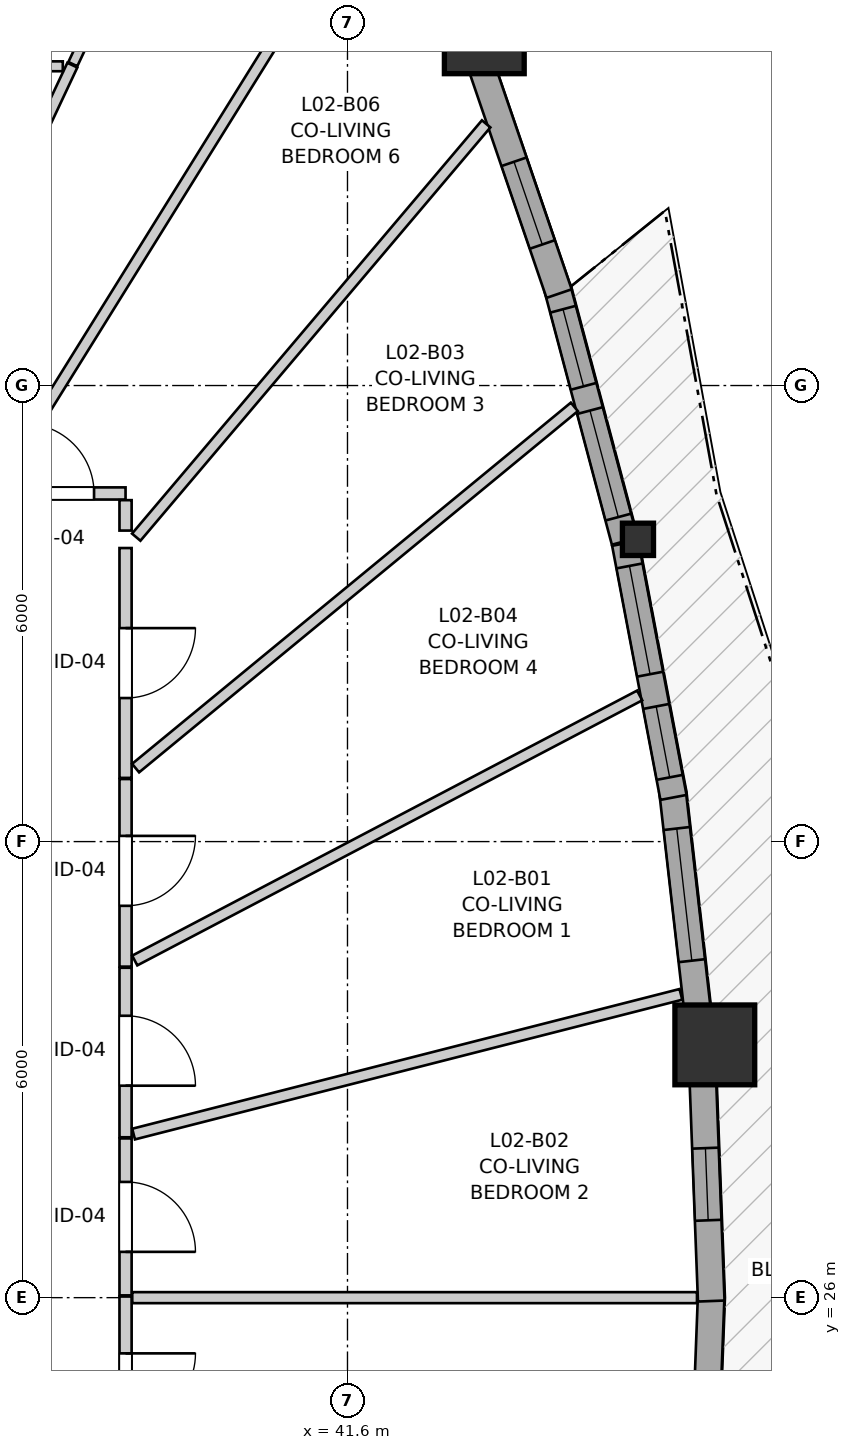
"""IFC4 building model, lengths in metres.
Left out: names, types, materials, properties, quantities, classifications, styles, units other than length and angle.
Written with IfcOpenShell. Run it as: python <this file> out.ifc"""

import sys

from ifc_helpers import new_model, si_unit, direction, frame, frame_2d, origin, origin_2d, place, context, subcontext, project, spatial, rectangle, i_section, extrude, source, transform, mapped, element, fill, save


model = new_model("IFC4")
c1 = context("Model", 3, precision=1e-05, world=origin(), true_north=direction((0.0, 1.0)))
c2 = subcontext(c1, "Body", "Model", "MODEL_VIEW")
j1 = project(units=[si_unit("LENGTHUNIT", "METRE"), si_unit("PLANEANGLEUNIT", "RADIAN")], contexts=[c1])
p1 = place(None, origin())
s1 = spatial("IfcSite", under=j1, at=p1, CompositionType="ELEMENT")
p2 = place(p1, origin())
s2 = spatial("IfcBuilding", under=s1, at=p2, CompositionType="ELEMENT")
p3 = place(p2, frame((0.0, 0.0, 11.0)))
s3 = spatial("IfcBuildingStorey", under=s2, at=p3, CompositionType="ELEMENT", Elevation=11.0)
m1 = source(origin(), c2, "Body", "SweptSolid", [
    extrude(rectangle(XDim=1.05, YDim=1.05, at=origin_2d()), origin(), (0.0, 0.0, 1.0), 2.94),
])
p4 = place(p3, frame((46.433, 29.325, 0.0), z_axis=(0.0, 0.0, 1.0), x_axis=(1.0, 0.0, 0.0)))
e1 = element("IfcColumn", 1, at=p4, inside=s3, PredefinedType="COLUMN", context=c2, shape_type="MappedRepresentation", body=[
    mapped(m1, transform((0.0, 0.0, 0.0), x_axis=(1.0, 0.0, 0.0), y_axis=(0.0, 1.0, 0.0), z_axis=(0.0, 0.0, 1.0), scale=1.0)),
])
m2 = source(origin(), c2, "Body", "SweptSolid", [
    extrude(i_section(OverallWidth=0.409, OverallDepth=0.425, WebThickness=0.03, FlangeThickness=0.048, FilletRadius=0.015, at=origin_2d()), origin(), (0.0, 0.0, 1.0), 2.94),
])
p5 = place(p3, frame((45.422, 35.977, 0.0), z_axis=(0.0, 0.0, 1.0), x_axis=(1.0, 0.0, 0.0)))
e2 = element("IfcColumn", 2, at=p5, inside=s3, PredefinedType="PILASTER", context=c2, shape_type="MappedRepresentation", body=[
    mapped(m2, transform((0.0, 0.0, 0.0), x_axis=(1.0, 0.0, 0.0), y_axis=(0.0, 1.0, 0.0), z_axis=(0.0, 0.0, 1.0), scale=1.0)),
])
p6 = place(p3, frame((43.4, 42.628, 0.0), z_axis=(0.0, 0.0, 1.0), x_axis=(1.0, 0.0, 0.0)))
e3 = element("IfcColumn", 3, at=p6, inside=s3, PredefinedType="COLUMN", context=c2, shape_type="MappedRepresentation", body=[
    mapped(m1, transform((0.0, 0.0, 0.0), x_axis=(1.0, 0.0, 0.0), y_axis=(0.0, 1.0, 0.0), z_axis=(0.0, 0.0, 1.0), scale=1.0)),
])
p7 = place(p3, frame((46.259, 22.701, 0.0), z_axis=(0.0, 0.0, 1.0), x_axis=(0.038015581842, 0.99927714651, 0.0)))
e4 = element("IfcWall", 4, at=p7, inside=s3, PredefinedType="SOLIDWALL", context=c2, shape_type="SweptSolid", body=[
    extrude(rectangle(XDim=3.346, YDim=0.35, at=frame_2d((1.673, 0.0))), origin(), (0.0, 0.0, 1.0), 2.42),
])
p8 = place(p7, frame((1.038, 0.0, 0.82)))
e5 = element("IfcOpeningElement", 5, at=p8, cuts=e4, PredefinedType="OPENING", context=c2, shape_type="SweptSolid", body=[
    extrude(rectangle(XDim=1.25, YDim=1.35, at=frame_2d((0.625, 0.675))), frame((0.0, 0.185, 0.0), z_axis=(0.0, -1.0, 0.0), x_axis=(1.0, 0.0, 0.0)), (0.0, 0.0, 1.0), 0.37),
])
p9 = place(p3, frame((46.386, 25.955, 0.0), z_axis=(0.0, 0.0, 1.0), x_axis=(-0.038063081658, 0.99927533834, 0.0)))
e6 = element("IfcWall", 6, at=p9, inside=s3, PredefinedType="SOLIDWALL", context=c2, shape_type="SweptSolid", body=[
    extrude(rectangle(XDim=3.066, YDim=0.35, at=frame_2d((1.533, 0.0))), origin(), (0.0, 0.0, 1.0), 2.42),
])
p10 = place(p9, frame((1.063, 0.0, 0.82)))
e7 = element("IfcOpeningElement", 7, at=p10, cuts=e6, PredefinedType="OPENING", context=c2, shape_type="SweptSolid", body=[
    extrude(rectangle(XDim=0.95, YDim=1.35, at=frame_2d((0.475, 0.675))), frame((0.0, 0.185, 0.0), z_axis=(0.0, -1.0, 0.0), x_axis=(1.0, 0.0, 0.0)), (0.0, 0.0, 1.0), 0.37),
])
p11 = place(p3, frame((46.225, 29.604, 0.0), z_axis=(0.0, 0.0, 1.0), x_axis=(-0.113323399269, 0.993558154905, 0.0)))
e8 = element("IfcWall", 8, at=p11, inside=s3, PredefinedType="SOLIDWALL", context=c2, shape_type="SweptSolid", body=[
    extrude(rectangle(XDim=3.085, YDim=0.35, at=frame_2d((1.542, 0.0))), origin(), (0.0, 0.0, 1.0), 2.42),
])
p12 = place(p11, frame((0.835, 0.0, 0.82)))
e9 = element("IfcOpeningElement", 9, at=p12, cuts=e8, PredefinedType="OPENING", context=c2, shape_type="SweptSolid", body=[
    extrude(rectangle(XDim=1.75, YDim=1.3, at=frame_2d((0.875, 0.65))), frame((0.0, 0.185, 0.0), z_axis=(0.0, -1.0, 0.0), x_axis=(1.0, 0.0, 0.0)), (0.0, 0.0, 1.0), 0.37),
])
p13 = place(p3, frame((45.889, 32.581, 0.0), z_axis=(0.0, 0.0, 1.0), x_axis=(-0.186670339622, 0.98242260983, 0.0)))
e10 = element("IfcWall", 10, at=p13, inside=s3, PredefinedType="SOLIDWALL", context=c2, shape_type="SweptSolid", body=[
    extrude(rectangle(XDim=3.403, YDim=0.35, at=frame_2d((1.702, 0.0))), origin(), (0.0, 0.0, 1.0), 2.42),
])
p14 = place(p13, frame((0.269, 0.0, 0.82)))
e11 = element("IfcOpeningElement", 11, at=p14, cuts=e10, PredefinedType="OPENING", context=c2, shape_type="SweptSolid", body=[
    extrude(rectangle(XDim=0.95, YDim=1.35, at=frame_2d((0.475, 0.675))), frame((0.0, 0.185, 0.0), z_axis=(0.0, -1.0, 0.0), x_axis=(1.0, 0.0, 0.0)), (0.0, 0.0, 1.0), 0.37),
])
p15 = place(p13, frame((1.65, 0.0, 0.82)))
e12 = element("IfcOpeningElement", 12, at=p15, cuts=e10, PredefinedType="OPENING", context=c2, shape_type="SweptSolid", body=[
    extrude(rectangle(XDim=1.45, YDim=1.25, at=frame_2d((0.725, 0.625))), frame((0.0, 0.185, 0.0), z_axis=(0.0, -1.0, 0.0), x_axis=(1.0, 0.0, 0.0)), (0.0, 0.0, 1.0), 0.37),
])
p16 = place(p3, frame((45.248, 35.951, 0.0), z_axis=(0.0, 0.0, 1.0), x_axis=(-0.25703883136, 0.966401075731, 0.0)))
e13 = element("IfcWall", 13, at=p16, inside=s3, PredefinedType="SOLIDWALL", context=c2, shape_type="SweptSolid", body=[
    extrude(rectangle(XDim=3.459, YDim=0.35, at=frame_2d((1.729, 0.0))), origin(), (0.0, 0.0, 1.0), 2.42),
])
p17 = place(p16, frame((0.329, 0.0, 0.82)))
e14 = element("IfcOpeningElement", 14, at=p17, cuts=e13, PredefinedType="OPENING", context=c2, shape_type="SweptSolid", body=[
    extrude(rectangle(XDim=1.45, YDim=1.25, at=frame_2d((0.725, 0.625))), frame((0.0, 0.185, 0.0), z_axis=(0.0, -1.0, 0.0), x_axis=(1.0, 0.0, 0.0)), (0.0, 0.0, 1.0), 0.37),
])
p18 = place(p16, frame((2.109, 0.0, 0.82)))
e15 = element("IfcOpeningElement", 15, at=p18, cuts=e13, PredefinedType="OPENING", context=c2, shape_type="SweptSolid", body=[
    extrude(rectangle(XDim=1.05, YDim=1.45, at=frame_2d((0.525, 0.725))), frame((0.0, 0.185, 0.0), z_axis=(0.0, -1.0, 0.0), x_axis=(1.0, 0.0, 0.0)), (0.0, 0.0, 1.0), 0.37),
])
p19 = place(p3, frame((44.384, 39.21, 0.0), z_axis=(0.0, 0.0, 1.0), x_axis=(-0.323604561993, 0.946192415663, 0.0)))
e16 = element("IfcWall", 16, at=p19, inside=s3, PredefinedType="SOLIDWALL", context=c2, shape_type="SweptSolid", body=[
    extrude(rectangle(XDim=3.252, YDim=0.35, at=frame_2d((1.626, 0.0))), origin(), (0.0, 0.0, 1.0), 2.42),
])
p20 = place(p19, frame((0.683, 0.0, 0.82)))
e17 = element("IfcOpeningElement", 17, at=p20, cuts=e16, PredefinedType="OPENING", context=c2, shape_type="SweptSolid", body=[
    extrude(rectangle(XDim=1.15, YDim=1.2, at=frame_2d((0.575, 0.6))), frame((0.0, 0.185, 0.0), z_axis=(0.0, -1.0, 0.0), x_axis=(1.0, 0.0, 0.0)), (0.0, 0.0, 1.0), 0.37),
])
p21 = place(p3, frame((38.68, 35.862, 0.0), z_axis=(0.0, 0.0, 1.0), x_axis=(0.0, -1.0, 0.0)))
e18 = element("IfcWall", 18, at=p21, inside=s3, PredefinedType="PARTITIONING", context=c2, shape_type="SweptSolid", body=[
    extrude(rectangle(XDim=3.024, YDim=0.16, at=frame_2d((1.512, 0.0))), origin(), (0.0, 0.0, 1.0), 2.94),
])
p22 = place(p21, frame((1.053, 0.0, 0.0)))
e19 = element("IfcOpeningElement", 19, at=p22, cuts=e18, PredefinedType="OPENING", context=c2, shape_type="SweptSolid", body=[
    extrude(rectangle(XDim=0.92, YDim=2.1, at=frame_2d((0.46, 1.05))), frame((0.0, 0.09, 0.0), z_axis=(0.0, -1.0, 0.0), x_axis=(1.0, 0.0, 0.0)), (0.0, 0.0, 1.0), 0.18),
])
p23 = place(p3, frame((38.68, 32.823, 0.0), z_axis=(0.0, 0.0, 1.0), x_axis=(0.0, -1.0, 0.0)))
e20 = element("IfcWall", 20, at=p23, inside=s3, PredefinedType="PARTITIONING", context=c2, shape_type="SweptSolid", body=[
    extrude(rectangle(XDim=2.468, YDim=0.16, at=frame_2d((1.234, 0.0))), origin(), (0.0, 0.0, 1.0), 2.94),
])
p24 = place(p23, frame((0.748, 0.0, 0.0)))
e21 = element("IfcOpeningElement", 21, at=p24, cuts=e20, PredefinedType="OPENING", context=c2, shape_type="SweptSolid", body=[
    extrude(rectangle(XDim=0.92, YDim=2.1, at=frame_2d((0.46, 1.05))), frame((0.0, 0.09, 0.0), z_axis=(0.0, -1.0, 0.0), x_axis=(1.0, 0.0, 0.0)), (0.0, 0.0, 1.0), 0.18),
])
p25 = place(p3, frame((38.68, 26.015, 0.0), z_axis=(0.0, 0.0, 1.0), x_axis=(0.0, -1.0, 0.0)))
e22 = element("IfcWall", 22, at=p25, inside=s3, PredefinedType="PARTITIONING", context=c2, shape_type="SweptSolid", body=[
    extrude(rectangle(XDim=2.37, YDim=0.16, at=frame_2d((1.185, 0.0))), origin(), (0.0, 0.0, 1.0), 2.94),
])
p26 = place(p25, frame((0.748, 0.0, 0.0)))
e23 = element("IfcOpeningElement", 23, at=p26, cuts=e22, PredefinedType="OPENING", context=c2, shape_type="SweptSolid", body=[
    extrude(rectangle(XDim=0.92, YDim=2.1, at=frame_2d((0.46, 1.05))), frame((0.0, 0.09, 0.0), z_axis=(0.0, -1.0, 0.0), x_axis=(1.0, 0.0, 0.0)), (0.0, 0.0, 1.0), 0.18),
])
p27 = place(p3, frame((38.68, 30.34, 0.0), z_axis=(0.0, 0.0, 1.0), x_axis=(0.0, -1.0, 0.0)))
e24 = element("IfcWall", 24, at=p27, inside=s3, PredefinedType="PARTITIONING", context=c2, shape_type="SweptSolid", body=[
    extrude(rectangle(XDim=2.23, YDim=0.16, at=frame_2d((1.115, 0.0))), origin(), (0.0, 0.0, 1.0), 2.94),
])
p28 = place(p27, frame((0.632, 0.0, 0.0)))
e25 = element("IfcOpeningElement", 25, at=p28, cuts=e24, PredefinedType="OPENING", context=c2, shape_type="SweptSolid", body=[
    extrude(rectangle(XDim=0.92, YDim=2.1, at=frame_2d((0.46, 1.05))), frame((0.0, 0.09, 0.0), z_axis=(0.0, -1.0, 0.0), x_axis=(1.0, 0.0, 0.0)), (0.0, 0.0, 1.0), 0.18),
])
p29 = place(p3, frame((38.68, 28.095, 0.0), z_axis=(0.0, 0.0, 1.0), x_axis=(0.0, -1.0, 0.0)))
e26 = element("IfcWall", 26, at=p29, inside=s3, PredefinedType="PARTITIONING", context=c2, shape_type="SweptSolid", body=[
    extrude(rectangle(XDim=2.065, YDim=0.16, at=frame_2d((1.032, 0.0))), origin(), (0.0, 0.0, 1.0), 2.94),
])
p30 = place(p29, frame((0.573, 0.0, 0.0)))
e27 = element("IfcOpeningElement", 27, at=p30, cuts=e26, PredefinedType="OPENING", context=c2, shape_type="SweptSolid", body=[
    extrude(rectangle(XDim=0.92, YDim=2.1, at=frame_2d((0.46, 1.05))), frame((0.0, 0.09, 0.0), z_axis=(0.0, -1.0, 0.0), x_axis=(1.0, 0.0, 0.0)), (0.0, 0.0, 1.0), 0.18),
])
p31 = place(p3, frame((36.913, 36.58, 0.0), z_axis=(0.0, 0.0, 1.0), x_axis=(1.0, 0.0, 0.0)))
e28 = element("IfcWall", 28, at=p31, inside=s3, PredefinedType="PARTITIONING", context=c2, shape_type="SweptSolid", body=[
    extrude(rectangle(XDim=1.767, YDim=0.16, at=frame_2d((0.883, 0.0))), origin(), (0.0, 0.0, 1.0), 2.94),
])
p32 = place(p31, frame((0.433, 0.0, 0.0)))
e29 = element("IfcOpeningElement", 29, at=p32, cuts=e28, PredefinedType="OPENING", context=c2, shape_type="SweptSolid", body=[
    extrude(rectangle(XDim=0.92, YDim=2.1, at=frame_2d((0.46, 1.05))), frame((0.0, 0.09, 0.0), z_axis=(0.0, -1.0, 0.0), x_axis=(1.0, 0.0, 0.0)), (0.0, 0.0, 1.0), 0.18),
])
p33 = place(p3, frame((37.009, 36.705, 0.0), z_axis=(0.0, 0.0, 1.0), x_axis=(0.528183829193, 0.849130050451, 0.0)))
e30 = element("IfcWall", 30, at=p33, inside=s3, PredefinedType="PARTITIONING", context=c2, shape_type="SweptSolid", body=[
    extrude(rectangle(XDim=10.005, YDim=0.145, at=frame_2d((5.003, 0.0))), origin(), (0.0, 0.0, 1.0), 2.94),
])
p34 = place(p3, frame((38.812, 32.967, 0.0), z_axis=(0.0, 0.0, 1.0), x_axis=(0.772048037558, 0.635564180633, 0.0)))
e31 = element("IfcWall", 31, at=p34, inside=s3, PredefinedType="PARTITIONING", context=c2, shape_type="SweptSolid", body=[
    extrude(rectangle(XDim=7.477, YDim=0.145, at=frame_2d((3.739, 0.0))), origin(), (0.0, 0.0, 1.0), 2.94),
])
p35 = place(p3, frame((38.801, 30.435, 0.0), z_axis=(0.0, 0.0, 1.0), x_axis=(0.885428701358, 0.46477523042, 0.0)))
e32 = element("IfcWall", 32, at=p35, inside=s3, PredefinedType="PARTITIONING", context=c2, shape_type="SweptSolid", body=[
    extrude(rectangle(XDim=7.503, YDim=0.145, at=frame_2d((3.751, 0.0))), origin(), (0.0, 0.0, 1.0), 2.94),
])
p36 = place(p3, frame((38.786, 28.152, 0.0), z_axis=(0.0, 0.0, 1.0), x_axis=(0.968940490632, 0.247294006424, 0.0)))
e33 = element("IfcWall", 33, at=p36, inside=s3, PredefinedType="PARTITIONING", context=c2, shape_type="SweptSolid", body=[
    extrude(rectangle(XDim=7.432, YDim=0.145, at=frame_2d((3.716, 0.0))), origin(), (0.0, 0.0, 1.0), 2.94),
])
p37 = place(p3, frame((38.768, 26.0, 0.0), z_axis=(0.0, 0.0, 1.0), x_axis=(1.0, 0.0, 0.0)))
e34 = element("IfcWall", 34, at=p37, inside=s3, PredefinedType="PARTITIONING", context=c2, shape_type="SweptSolid", body=[
    extrude(rectangle(XDim=7.43, YDim=0.145, at=frame_2d((3.715, 0.0))), origin(), (0.0, 0.0, 1.0), 2.94),
])
p38 = place(p3, frame((38.821, 36.005, 0.0), z_axis=(0.0, 0.0, 1.0), x_axis=(0.646174151972, 0.76318999294, 0.0)))
e35 = element("IfcWall", 35, at=p38, inside=s3, PredefinedType="PARTITIONING", context=c2, shape_type="SweptSolid", body=[
    extrude(rectangle(XDim=7.125, YDim=0.145, at=frame_2d((3.562, 0.0))), origin(), (0.0, 0.0, 1.0), 2.94),
])
p39 = place(p3, frame((35.385, 36.698, 0.0), z_axis=(0.0, 0.0, 1.0), x_axis=(0.425687116038, 0.904870421242, 0.0)))
e36 = element("IfcWall", 36, at=p39, inside=s3, PredefinedType="PARTITIONING", context=c2, shape_type="SweptSolid", body=[
    extrude(rectangle(XDim=6.097, YDim=0.145, at=frame_2d((3.049, 0.0))), origin(), (0.0, 0.0, 1.0), 2.94),
])
p40 = place(p3, frame((37.987, 42.229, 0.0), z_axis=(0.0, 0.0, 1.0), x_axis=(0.425771690569, 0.904830629184, 0.0)))
e37 = element("IfcWall", 37, at=p40, inside=s3, PredefinedType="PARTITIONING", context=c2, shape_type="SweptSolid", body=[
    extrude(rectangle(XDim=1.855, YDim=0.13, at=frame_2d((0.928, 0.0))), origin(), (0.0, 0.0, 1.0), 2.94),
])
p41 = place(p3, frame((37.071, 42.2, 0.0), z_axis=(0.0, 0.0, 1.0), x_axis=(1.0, 0.0, 0.0)))
e38 = element("IfcWall", 38, at=p41, inside=s3, PredefinedType="PARTITIONING", context=c2, shape_type="SweptSolid", body=[
    extrude(rectangle(XDim=0.783, YDim=0.13, at=frame_2d((0.392, 0.0))), origin(), (0.0, 0.0, 1.0), 2.94),
])
p42 = place(p3, frame((38.68, 36.092, 0.0), z_axis=(0.0, 0.0, 1.0), x_axis=(0.0, 1.0, 0.0)))
e39 = element("IfcWall", 39, at=p42, inside=s3, PredefinedType="PARTITIONING", context=c2, shape_type="SweptSolid", body=[
    extrude(rectangle(XDim=0.4, YDim=0.16, at=frame_2d((0.2, 0.0))), origin(), (0.0, 0.0, 1.0), 2.94),
])
m3 = source(origin(), c2, "Body", "SweptSolid", [
    extrude(rectangle(XDim=0.95, YDim=1.35, at=frame_2d((0.475, 0.675))), frame((0.0, 0.03, 0.0), z_axis=(0.0, -1.0, 0.0), x_axis=(1.0, 0.0, 0.0)), (0.0, 0.0, 1.0), 0.06),
])
p43 = place(p10, origin())
e40 = element("IfcWindow", 40, at=p43, inside=s3, PartitioningType="SINGLE_PANEL", PredefinedType="WINDOW", context=c2, shape_type="MappedRepresentation", body=[
    mapped(m3, transform((0.0, 0.0, 0.0), x_axis=(1.0, 0.0, 0.0), y_axis=(0.0, 1.0, 0.0), z_axis=(0.0, 0.0, 1.0), scale=1.0)),
])
fill(e7, e40)
m4 = source(origin(), c2, "Body", "SweptSolid", [
    extrude(rectangle(XDim=1.75, YDim=1.3, at=frame_2d((0.875, 0.65))), frame((0.0, 0.03, 0.0), z_axis=(0.0, -1.0, 0.0), x_axis=(1.0, 0.0, 0.0)), (0.0, 0.0, 1.0), 0.06),
])
p44 = place(p12, origin())
e41 = element("IfcWindow", 41, at=p44, inside=s3, PartitioningType="SINGLE_PANEL", PredefinedType="WINDOW", context=c2, shape_type="MappedRepresentation", body=[
    mapped(m4, transform((0.0, 0.0, 0.0), x_axis=(1.0, 0.0, 0.0), y_axis=(0.0, 1.0, 0.0), z_axis=(0.0, 0.0, 1.0), scale=1.0)),
])
fill(e9, e41)
p45 = place(p14, origin())
e42 = element("IfcWindow", 42, at=p45, inside=s3, PartitioningType="SINGLE_PANEL", PredefinedType="WINDOW", context=c2, shape_type="MappedRepresentation", body=[
    mapped(m3, transform((0.0, 0.0, 0.0), x_axis=(1.0, 0.0, 0.0), y_axis=(0.0, 1.0, 0.0), z_axis=(0.0, 0.0, 1.0), scale=1.0)),
])
fill(e11, e42)
m5 = source(origin(), c2, "Body", "SweptSolid", [
    extrude(rectangle(XDim=1.45, YDim=1.25, at=frame_2d((0.725, 0.625))), frame((0.0, 0.03, 0.0), z_axis=(0.0, -1.0, 0.0), x_axis=(1.0, 0.0, 0.0)), (0.0, 0.0, 1.0), 0.06),
])
p46 = place(p15, origin())
e43 = element("IfcWindow", 43, at=p46, inside=s3, PartitioningType="SINGLE_PANEL", PredefinedType="WINDOW", context=c2, shape_type="MappedRepresentation", body=[
    mapped(m5, transform((0.0, 0.0, 0.0), x_axis=(1.0, 0.0, 0.0), y_axis=(0.0, 1.0, 0.0), z_axis=(0.0, 0.0, 1.0), scale=1.0)),
])
fill(e12, e43)
p47 = place(p17, origin())
e44 = element("IfcWindow", 44, at=p47, inside=s3, PartitioningType="SINGLE_PANEL", PredefinedType="WINDOW", context=c2, shape_type="MappedRepresentation", body=[
    mapped(m5, transform((0.0, 0.0, 0.0), x_axis=(1.0, 0.0, 0.0), y_axis=(0.0, 1.0, 0.0), z_axis=(0.0, 0.0, 1.0), scale=1.0)),
])
fill(e14, e44)
m6 = source(origin(), c2, "Body", "SweptSolid", [
    extrude(rectangle(XDim=1.05, YDim=1.45, at=frame_2d((0.525, 0.725))), frame((0.0, 0.03, 0.0), z_axis=(0.0, -1.0, 0.0), x_axis=(1.0, 0.0, 0.0)), (0.0, 0.0, 1.0), 0.06),
])
p48 = place(p18, origin())
e45 = element("IfcWindow", 45, at=p48, inside=s3, PartitioningType="SINGLE_PANEL", PredefinedType="WINDOW", context=c2, shape_type="MappedRepresentation", body=[
    mapped(m6, transform((0.0, 0.0, 0.0), x_axis=(1.0, 0.0, 0.0), y_axis=(0.0, 1.0, 0.0), z_axis=(0.0, 0.0, 1.0), scale=1.0)),
])
fill(e15, e45)
m7 = source(origin(), c2, "Body", "SweptSolid", [
    extrude(rectangle(XDim=1.15, YDim=1.2, at=frame_2d((0.575, 0.6))), frame((0.0, 0.03, 0.0), z_axis=(0.0, -1.0, 0.0), x_axis=(1.0, 0.0, 0.0)), (0.0, 0.0, 1.0), 0.06),
])
p49 = place(p20, origin())
e46 = element("IfcWindow", 46, at=p49, inside=s3, PartitioningType="SINGLE_PANEL", PredefinedType="WINDOW", context=c2, shape_type="MappedRepresentation", body=[
    mapped(m7, transform((0.0, 0.0, 0.0), x_axis=(1.0, 0.0, 0.0), y_axis=(0.0, 1.0, 0.0), z_axis=(0.0, 0.0, 1.0), scale=1.0)),
])
fill(e17, e46)
m8 = source(origin(), c2, "Body", "SweptSolid", [
    extrude(rectangle(XDim=0.92, YDim=2.1, at=frame_2d((0.46, 1.05))), frame((0.0, 0.025, 0.0), z_axis=(0.0, -1.0, 0.0), x_axis=(1.0, 0.0, 0.0)), (0.0, 0.0, 1.0), 0.05),
])
p50 = place(p22, origin())
e47 = element("IfcDoor", 47, at=p50, inside=s3, OperationType="SINGLE_SWING_LEFT", PredefinedType="DOOR", context=c2, shape_type="MappedRepresentation", body=[
    mapped(m8, transform((0.0, 0.0, 0.0), x_axis=(1.0, 0.0, 0.0), y_axis=(0.0, 1.0, 0.0), z_axis=(0.0, 0.0, 1.0), scale=1.0)),
])
fill(e19, e47)
p51 = place(p24, origin())
e48 = element("IfcDoor", 48, at=p51, inside=s3, OperationType="SINGLE_SWING_LEFT", PredefinedType="DOOR", context=c2, shape_type="MappedRepresentation", body=[
    mapped(m8, transform((0.0, 0.0, 0.0), x_axis=(1.0, 0.0, 0.0), y_axis=(0.0, 1.0, 0.0), z_axis=(0.0, 0.0, 1.0), scale=1.0)),
])
fill(e21, e48)
p52 = place(p26, origin())
e49 = element("IfcDoor", 49, at=p52, inside=s3, OperationType="SINGLE_SWING_LEFT", PredefinedType="DOOR", context=c2, shape_type="MappedRepresentation", body=[
    mapped(m8, transform((0.0, 0.0, 0.0), x_axis=(1.0, 0.0, 0.0), y_axis=(0.0, 1.0, 0.0), z_axis=(0.0, 0.0, 1.0), scale=1.0)),
])
fill(e23, e49)
p53 = place(p28, origin())
e50 = element("IfcDoor", 50, at=p53, inside=s3, OperationType="SINGLE_SWING_RIGHT", PredefinedType="DOOR", context=c2, shape_type="MappedRepresentation", body=[
    mapped(m8, transform((0.0, 0.0, 0.0), x_axis=(1.0, 0.0, 0.0), y_axis=(0.0, 1.0, 0.0), z_axis=(0.0, 0.0, 1.0), scale=1.0)),
])
fill(e25, e50)
p54 = place(p30, origin())
e51 = element("IfcDoor", 51, at=p54, inside=s3, OperationType="SINGLE_SWING_RIGHT", PredefinedType="DOOR", context=c2, shape_type="MappedRepresentation", body=[
    mapped(m8, transform((0.0, 0.0, 0.0), x_axis=(1.0, 0.0, 0.0), y_axis=(0.0, 1.0, 0.0), z_axis=(0.0, 0.0, 1.0), scale=1.0)),
])
fill(e27, e51)
p55 = place(p32, origin())
e52 = element("IfcDoor", 52, at=p55, inside=s3, OperationType="SINGLE_SWING_LEFT", PredefinedType="DOOR", context=c2, shape_type="MappedRepresentation", body=[
    mapped(m8, transform((0.0, 0.0, 0.0), x_axis=(1.0, 0.0, 0.0), y_axis=(0.0, 1.0, 0.0), z_axis=(0.0, 0.0, 1.0), scale=1.0)),
])
fill(e29, e52)
save(model, sys.argv[1])
